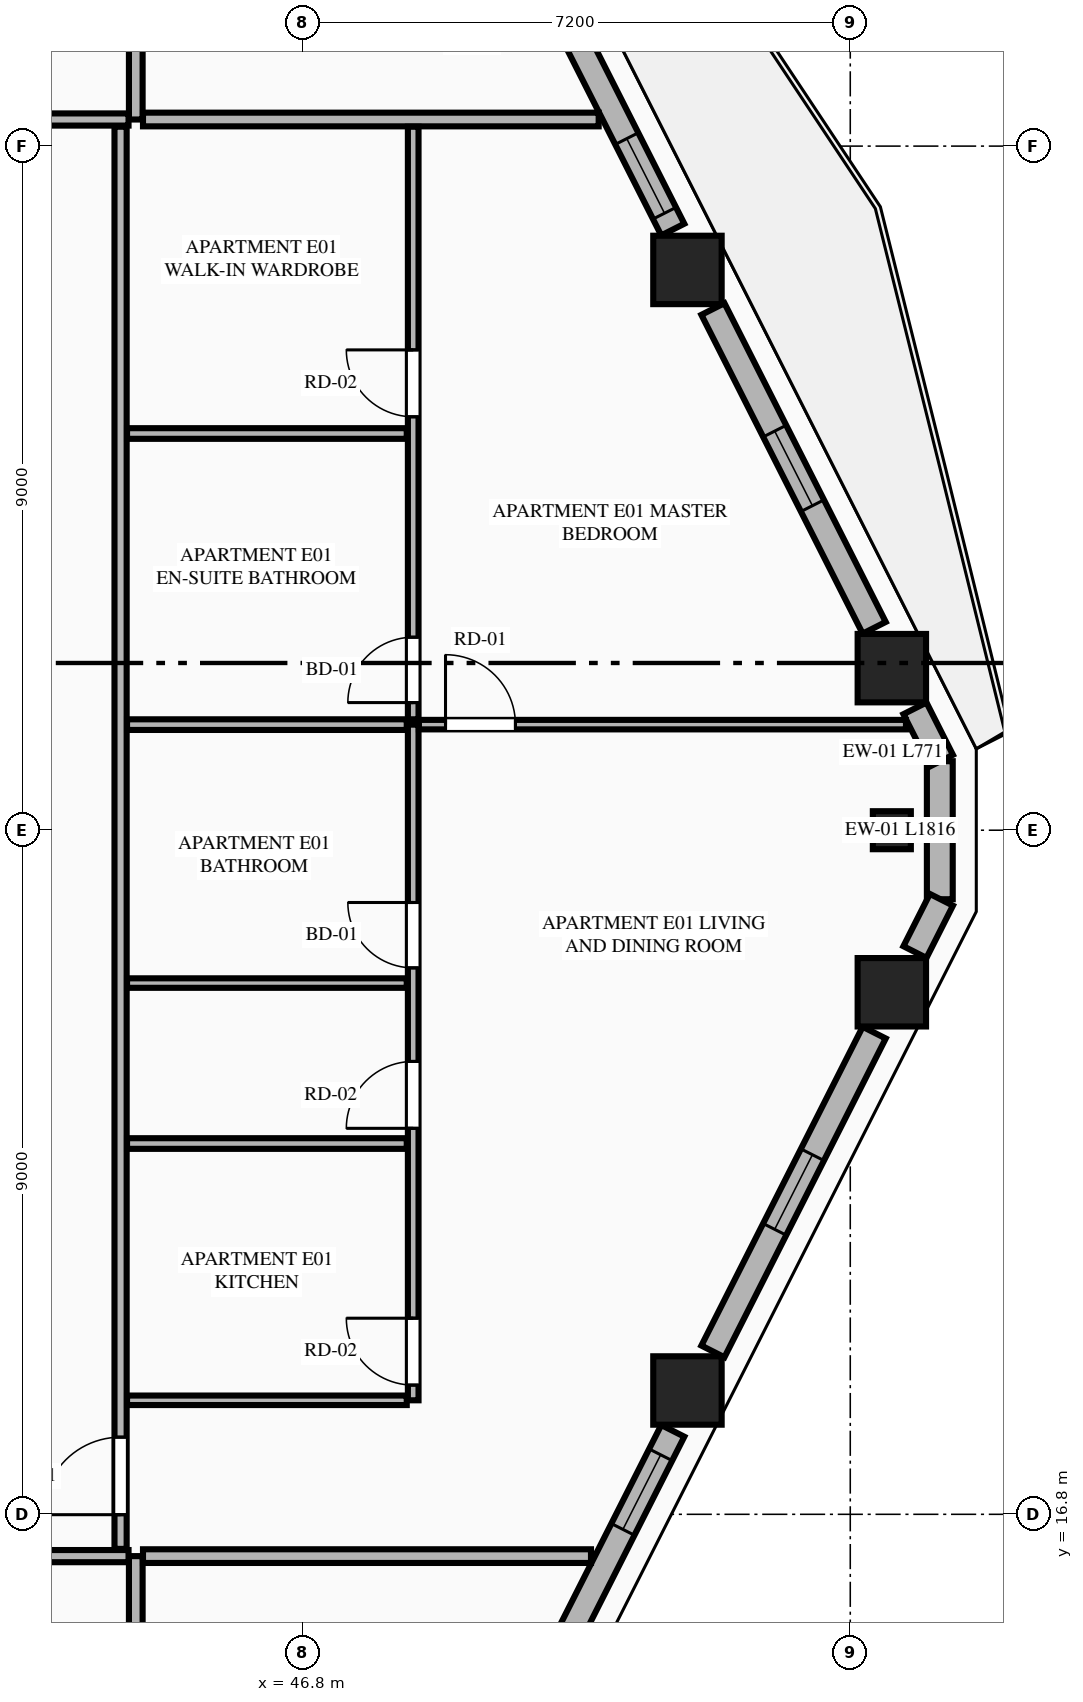
"""IFC4 building model, lengths in metres.
Left out: names, types, materials, properties, quantities, classifications, styles, units other than length and angle.
Written with IfcOpenShell. Run it as: python <this file> out.ifc"""

import sys

from ifc_helpers import new_model, si_unit, direction, frame, frame_2d, origin, origin_2d, place, context, subcontext, project, spatial, rectangle, extrude, element, fill, save


model = new_model("IFC4")
c1 = context("Model", 3, precision=1e-05, world=origin(), true_north=direction((0.0, 1.0)))
c2 = subcontext(c1, "Body", "Model", "MODEL_VIEW")
j1 = project(units=[si_unit("LENGTHUNIT", "METRE"), si_unit("PLANEANGLEUNIT", "RADIAN")], contexts=[c1])
p1 = place(None, origin())
s1 = spatial("IfcSite", under=j1, at=p1, CompositionType="ELEMENT")
p2 = place(p1, origin())
s2 = spatial("IfcBuilding", under=s1, at=p2, CompositionType="ELEMENT")
p3 = place(p2, frame((0.0, 0.0, 179.0)))
s3 = spatial("IfcBuildingStorey", under=s2, at=p3, CompositionType="ELEMENT", Elevation=179.0)
for number, where, z_axis, x_axis in (
    (1, (51.858, 18.429, 0.0), (0.0, 0.0, 1.0), (1.0, 0.0, 0.0)),
    (2, (54.547, 23.668, 0.0), (0.0, 0.0, 1.0), (1.0, 0.0, 0.0)),
    (3, (54.547, 27.932, 0.0), (0.0, 0.0, 1.0), (1.0, 0.0, 0.0)),
    (4, (51.858, 33.171, 0.0), (0.0, 0.0, 1.0), (1.0, 0.0, 0.0)),
):
    element("IfcColumn", number, at=place(p3, frame(where, z_axis=z_axis, x_axis=x_axis)), inside=s3, PredefinedType="COLUMN", context=c2, shape_type="SweptSolid", body=[
        extrude(rectangle(XDim=0.9, YDim=0.9, at=origin_2d()), origin(), (0.0, 0.0, 1.0), 3.55),
    ])
p4 = place(p3, frame((54.547, 25.8, 0.0), z_axis=(0.0, 0.0, 1.0), x_axis=(0.0, 1.0, 0.0)))
e5 = element("IfcColumn", 5, at=p4, inside=s3, PredefinedType="PILASTER", context=c2, shape_type="SweptSolid", body=[
    extrude(rectangle(XDim=0.5, YDim=0.35, at=origin_2d()), origin(), (0.0, 0.0, 1.0), 3.55),
])
p5 = place(p3, frame((55.178, 24.892, 0.0), z_axis=(0.0, 0.0, 1.0), x_axis=(0.0, 1.0, 0.0)))
e6 = element("IfcWall", 6, at=p5, inside=s3, PredefinedType="STANDARD", context=c2, shape_type="SweptSolid", body=[
    extrude(rectangle(XDim=1.816, YDim=0.34, at=frame_2d((0.908, 0.0))), origin(), (0.0, 0.0, 1.0), 3.35),
])
p6 = place(p3, frame((49.448, 13.517, 0.0), z_axis=(0.0, 0.0, 1.0), x_axis=(0.451544279509, 0.892248711763, 0.0)))
e7 = element("IfcWall", 7, at=p6, inside=s3, PredefinedType="STANDARD", context=c2, shape_type="SweptSolid", body=[
    extrude(rectangle(XDim=4.91, YDim=0.34, at=frame_2d((2.455, 0.0))), origin(), (0.0, 0.0, 1.0), 2.883),
])
p7 = place(p6, frame((0.851, 0.0, 0.75)))
e8 = element("IfcOpeningElement", 8, at=p7, cuts=e7, PredefinedType="OPENING", context=c2, shape_type="SweptSolid", body=[
    extrude(rectangle(XDim=1.1, YDim=1.983, at=frame_2d((0.55, 0.991))), frame((0.0, 0.18, 0.0), z_axis=(0.0, -1.0, 0.0), x_axis=(1.0, 0.0, 0.0)), (0.0, 0.0, 1.0), 0.36),
])
p8 = place(p6, frame((3.457, 0.0, 0.75)))
e9 = element("IfcOpeningElement", 9, at=p8, cuts=e7, PredefinedType="OPENING", context=c2, shape_type="SweptSolid", body=[
    extrude(rectangle(XDim=1.1, YDim=1.983, at=frame_2d((0.55, 0.991))), frame((0.0, 0.18, 0.0), z_axis=(0.0, -1.0, 0.0), x_axis=(1.0, 0.0, 0.0)), (0.0, 0.0, 1.0), 0.36),
])
p9 = place(p3, frame((52.193, 18.943, 0.0), z_axis=(0.0, 0.0, 1.0), x_axis=(0.451447222193, 0.892297823361, 0.0)))
e10 = element("IfcWall", 10, at=p9, inside=s3, PredefinedType="STANDARD", context=c2, shape_type="SweptSolid", body=[
    extrude(rectangle(XDim=4.7, YDim=0.34, at=frame_2d((2.35, 0.0))), origin(), (0.0, 0.0, 1.0), 2.883),
])
p10 = place(p9, frame((1.8, 0.0, 0.75)))
e11 = element("IfcOpeningElement", 11, at=p10, cuts=e10, PredefinedType="OPENING", context=c2, shape_type="SweptSolid", body=[
    extrude(rectangle(XDim=1.1, YDim=1.983, at=frame_2d((0.55, 0.991))), frame((0.0, 0.18, 0.0), z_axis=(0.0, -1.0, 0.0), x_axis=(1.0, 0.0, 0.0)), (0.0, 0.0, 1.0), 0.36),
])
for number, where, z_axis, x_axis in (
    (12, (54.851, 24.197, 0.0), (0.0, 0.0, 1.0), (0.451, 0.892, 0.0)),
    (13, (55.199, 26.715, 0.0), (0.0, 0.0, 1.0), (-0.451, 0.892, 0.0)),
):
    element("IfcWall", number, at=place(p3, frame(where, z_axis=z_axis, x_axis=x_axis)), inside=s3, PredefinedType="STANDARD", context=c2, shape_type="SweptSolid", body=[
        extrude(rectangle(XDim=0.771, YDim=0.34, at=frame_2d((0.385, 0.0))), origin(), (0.0, 0.0, 1.0), 3.35),
    ])
p11 = place(p3, frame((54.315, 28.463, 0.0), z_axis=(0.0, 0.0, 1.0), x_axis=(-0.451426298588, 0.892308409096, 0.0)))
e14 = element("IfcWall", 14, at=p11, inside=s3, PredefinedType="STANDARD", context=c2, shape_type="SweptSolid", body=[
    extrude(rectangle(XDim=4.7, YDim=0.34, at=frame_2d((2.35, 0.0))), origin(), (0.0, 0.0, 1.0), 2.883),
])
p12 = place(p11, frame((1.8, 0.0, 0.75)))
e15 = element("IfcOpeningElement", 15, at=p12, cuts=e14, PredefinedType="OPENING", context=c2, shape_type="SweptSolid", body=[
    extrude(rectangle(XDim=1.1, YDim=1.983, at=frame_2d((0.55, 0.991))), frame((0.0, 0.18, 0.0), z_axis=(0.0, -1.0, 0.0), x_axis=(1.0, 0.0, 0.0)), (0.0, 0.0, 1.0), 0.36),
])
p13 = place(p3, frame((51.665, 33.702, 0.0), z_axis=(0.0, 0.0, 1.0), x_axis=(-0.451524246964, 0.89225884944, 0.0)))
e16 = element("IfcWall", 16, at=p13, inside=s3, PredefinedType="STANDARD", context=c2, shape_type="SweptSolid", body=[
    extrude(rectangle(XDim=4.91, YDim=0.34, at=frame_2d((2.455, 0.0))), origin(), (0.0, 0.0, 1.0), 2.883),
])
p14 = place(p13, frame((2.842, 0.0, 0.0)))
e17 = element("IfcOpeningElement", 17, at=p14, cuts=e16, PredefinedType="OPENING", context=c2, shape_type="SweptSolid", body=[
    extrude(rectangle(XDim=1.1, YDim=2.25, at=frame_2d((0.55, 1.125))), frame((0.0, 0.18, 0.0), z_axis=(0.0, -1.0, 0.0), x_axis=(1.0, 0.0, 0.0)), (0.0, 0.0, 1.0), 0.36),
])
p15 = place(p13, frame((0.241, 0.0, 0.75)))
e18 = element("IfcOpeningElement", 18, at=p15, cuts=e16, PredefinedType="OPENING", context=c2, shape_type="SweptSolid", body=[
    extrude(rectangle(XDim=1.1, YDim=1.983, at=frame_2d((0.55, 0.991))), frame((0.0, 0.18, 0.0), z_axis=(0.0, -1.0, 0.0), x_axis=(1.0, 0.0, 0.0)), (0.0, 0.0, 1.0), 0.36),
])
p16 = place(p3, frame((44.6, 5.968, 0.0), z_axis=(0.0, 0.0, 1.0), x_axis=(0.0, 1.0, 0.0)))
e19 = element("IfcWall", 19, at=p16, inside=s3, PredefinedType="PARTITIONING", context=c2, shape_type="SweptSolid", body=[
    extrude(rectangle(XDim=10.282, YDim=0.18, at=frame_2d((5.141, 0.0))), origin(), (0.0, 0.0, 1.0), 3.35),
])
p17 = place(p3, frame((28.952, 16.25, 0.0), z_axis=(0.0, 0.0, 1.0), x_axis=(1.0, 0.0, 0.0)))
e20 = element("IfcWall", 20, at=p17, inside=s3, PredefinedType="PARTITIONING", context=c2, shape_type="SweptSolid", body=[
    extrude(rectangle(XDim=15.553, YDim=0.16, at=frame_2d((7.776, 0.0))), origin(), (0.0, 0.0, 1.0), 3.35),
])
p18 = place(p17, frame((0.355, 0.0, 0.0)))
e21 = element("IfcOpeningElement", 21, at=p18, cuts=e20, PredefinedType="OPENING", context=c2, shape_type="SweptSolid", body=[
    extrude(rectangle(XDim=1.02, YDim=2.25, at=frame_2d((0.51, 1.125))), frame((0.0, 0.09, 0.0), z_axis=(0.0, -1.0, 0.0), x_axis=(1.0, 0.0, 0.0)), (0.0, 0.0, 1.0), 0.18),
])
p19 = place(p3, frame((44.6, 35.15, 0.0), z_axis=(0.0, 0.0, 1.0), x_axis=(0.0, 1.0, 0.0)))
e22 = element("IfcWall", 22, at=p19, inside=s3, PredefinedType="PARTITIONING", context=c2, shape_type="SweptSolid", body=[
    extrude(rectangle(XDim=10.482, YDim=0.18, at=frame_2d((5.241, 0.0))), origin(), (0.0, 0.0, 1.0), 3.35),
])
p20 = place(p3, frame((36.038, 35.15, 0.0), z_axis=(0.0, 0.0, 1.0), x_axis=(1.0, 0.0, 0.0)))
e23 = element("IfcWall", 23, at=p20, inside=s3, PredefinedType="PARTITIONING", context=c2, shape_type="SweptSolid", body=[
    extrude(rectangle(XDim=8.467, YDim=0.16, at=frame_2d((4.233, 0.0))), origin(), (0.0, 0.0, 1.0), 3.35),
])
p21 = place(p20, frame((6.212, 0.0, 0.0)))
e24 = element("IfcOpeningElement", 24, at=p21, cuts=e23, PredefinedType="OPENING", context=c2, shape_type="SweptSolid", body=[
    extrude(rectangle(XDim=1.02, YDim=2.25, at=frame_2d((0.51, 1.125))), frame((0.0, 0.09, 0.0), z_axis=(0.0, -1.0, 0.0), x_axis=(1.0, 0.0, 0.0)), (0.0, 0.0, 1.0), 0.18),
])
p22 = place(p3, frame((44.695, 16.25, 0.0), z_axis=(0.0, 0.0, 1.0), x_axis=(1.0, 0.0, 0.0)))
e25 = element("IfcWall", 25, at=p22, inside=s3, PredefinedType="PARTITIONING", context=c2, shape_type="SweptSolid", body=[
    extrude(rectangle(XDim=5.894, YDim=0.18, at=frame_2d((2.947, 0.0))), origin(), (0.0, 0.0, 1.0), 3.35),
])
p23 = place(p3, frame((44.695, 35.15, 0.0), z_axis=(0.0, 0.0, 1.0), x_axis=(1.0, 0.0, 0.0)))
e26 = element("IfcWall", 26, at=p23, inside=s3, PredefinedType="PARTITIONING", context=c2, shape_type="SweptSolid", body=[
    extrude(rectangle(XDim=5.995, YDim=0.18, at=frame_2d((2.998, 0.0))), origin(), (0.0, 0.0, 1.0), 3.35),
])
p24 = place(p3, frame((44.4, 16.345, 0.0), z_axis=(0.0, 0.0, 1.0), x_axis=(0.0, 1.0, 0.0)))
e27 = element("IfcWall", 27, at=p24, inside=s3, PredefinedType="PARTITIONING", context=c2, shape_type="SweptSolid", body=[
    extrude(rectangle(XDim=18.71, YDim=0.16, at=frame_2d((9.355, 0.0))), origin(), (0.0, 0.0, 1.0), 3.35),
])
p25 = place(p24, frame((0.45, 0.0, 0.0)))
e28 = element("IfcOpeningElement", 28, at=p25, cuts=e27, PredefinedType="OPENING", context=c2, shape_type="SweptSolid", body=[
    extrude(rectangle(XDim=1.02, YDim=2.25, at=frame_2d((0.51, 1.125))), frame((0.0, 0.09, 0.0), z_axis=(0.0, -1.0, 0.0), x_axis=(1.0, 0.0, 0.0)), (0.0, 0.0, 1.0), 0.18),
])
p26 = place(p3, frame((44.485, 18.3, 0.0), z_axis=(0.0, 0.0, 1.0), x_axis=(1.0, 0.0, 0.0)))
e29 = element("IfcWall", 29, at=p26, inside=s3, PredefinedType="PARTITIONING", context=c2, shape_type="SweptSolid", body=[
    extrude(rectangle(XDim=3.68, YDim=0.125, at=frame_2d((1.84, 0.0))), origin(), (0.0, 0.0, 1.0), 2.807),
])
p27 = place(p3, frame((48.25, 18.3, 0.0), z_axis=(0.0, 0.0, 1.0), x_axis=(0.0, 1.0, 0.0)))
e30 = element("IfcWall", 30, at=p27, inside=s3, PredefinedType="PLUMBINGWALL", context=c2, shape_type="SweptSolid", body=[
    extrude(rectangle(XDim=8.889, YDim=0.14, at=frame_2d((4.444, 0.0))), origin(), (0.0, 0.0, 1.0), 3.35),
])
p28 = place(p27, frame((0.2, 0.0, 0.0)))
e31 = element("IfcOpeningElement", 31, at=p28, cuts=e30, PredefinedType="OPENING", context=c2, shape_type="SweptSolid", body=[
    extrude(rectangle(XDim=0.88, YDim=2.15, at=frame_2d((0.44, 1.075))), frame((0.0, 0.08, 0.0), z_axis=(0.0, -1.0, 0.0), x_axis=(1.0, 0.0, 0.0)), (0.0, 0.0, 1.0), 0.16),
])
p29 = place(p27, frame((3.578, 0.0, 0.0)))
e32 = element("IfcOpeningElement", 32, at=p29, cuts=e30, PredefinedType="OPENING", context=c2, shape_type="SweptSolid", body=[
    extrude(rectangle(XDim=0.88, YDim=2.15, at=frame_2d((0.44, 1.075))), frame((0.0, 0.08, 0.0), z_axis=(0.0, -1.0, 0.0), x_axis=(1.0, 0.0, 0.0)), (0.0, 0.0, 1.0), 0.16),
])
p30 = place(p27, frame((5.689, 0.0, 0.0)))
e33 = element("IfcOpeningElement", 33, at=p30, cuts=e30, PredefinedType="OPENING", context=c2, shape_type="SweptSolid", body=[
    extrude(rectangle(XDim=0.86, YDim=2.1, at=frame_2d((0.43, 1.05))), frame((0.0, 0.08, 0.0), z_axis=(0.0, -1.0, 0.0), x_axis=(1.0, 0.0, 0.0)), (0.0, 0.0, 1.0), 0.16),
])
p31 = place(p3, frame((48.25, 27.259, 0.0), z_axis=(0.0, 0.0, 1.0), x_axis=(0.0, 1.0, 0.0)))
e34 = element("IfcWall", 34, at=p31, inside=s3, PredefinedType="PLUMBINGWALL", context=c2, shape_type="SweptSolid", body=[
    extrude(rectangle(XDim=7.796, YDim=0.14, at=frame_2d((3.898, 0.0))), origin(), (0.0, 0.0, 1.0), 3.35),
])
p32 = place(p31, frame((0.22, 0.0, 0.0)))
e35 = element("IfcOpeningElement", 35, at=p32, cuts=e34, PredefinedType="OPENING", context=c2, shape_type="SweptSolid", body=[
    extrude(rectangle(XDim=0.86, YDim=2.1, at=frame_2d((0.43, 1.05))), frame((0.0, 0.08, 0.0), z_axis=(0.0, -1.0, 0.0), x_axis=(1.0, 0.0, 0.0)), (0.0, 0.0, 1.0), 0.16),
])
p33 = place(p31, frame((3.98, 0.0, 0.0)))
e36 = element("IfcOpeningElement", 36, at=p33, cuts=e34, PredefinedType="OPENING", context=c2, shape_type="SweptSolid", body=[
    extrude(rectangle(XDim=0.88, YDim=2.15, at=frame_2d((0.44, 1.075))), frame((0.0, 0.08, 0.0), z_axis=(0.0, -1.0, 0.0), x_axis=(1.0, 0.0, 0.0)), (0.0, 0.0, 1.0), 0.16),
])
p34 = place(p3, frame((44.485, 27.189, 0.0), z_axis=(0.0, 0.0, 1.0), x_axis=(1.0, 0.0, 0.0)))
e37 = element("IfcWall", 37, at=p34, inside=s3, PredefinedType="PLUMBINGWALL", context=c2, shape_type="SweptSolid", body=[
    extrude(rectangle(XDim=3.68, YDim=0.14, at=frame_2d((1.84, 0.0))), origin(), (0.0, 0.0, 1.0), 3.35),
])
p35 = place(p3, frame((48.325, 27.189, 0.0), z_axis=(0.0, 0.0, 1.0), x_axis=(1.0, 0.0, 0.0)))
e38 = element("IfcWall", 38, at=p35, inside=s3, PredefinedType="PARTITIONING", context=c2, shape_type="SweptSolid", body=[
    extrude(rectangle(XDim=6.408, YDim=0.125, at=frame_2d((3.204, 0.0))), origin(), (0.0, 0.0, 1.0), 3.35),
])
p36 = place(p35, frame((0.35, 0.0, 0.0)))
e39 = element("IfcOpeningElement", 39, at=p36, cuts=e38, PredefinedType="OPENING", context=c2, shape_type="SweptSolid", body=[
    extrude(rectangle(XDim=0.92, YDim=2.15, at=frame_2d((0.46, 1.075))), frame((0.0, 0.073, 0.0), z_axis=(0.0, -1.0, 0.0), x_axis=(1.0, 0.0, 0.0)), (0.0, 0.0, 1.0), 0.145),
])
p37 = place(p3, frame((44.485, 21.678, 0.0), z_axis=(0.0, 0.0, 1.0), x_axis=(1.0, 0.0, 0.0)))
e40 = element("IfcWall", 40, at=p37, inside=s3, PredefinedType="PLUMBINGWALL", context=c2, shape_type="SweptSolid", body=[
    extrude(rectangle(XDim=3.68, YDim=0.14, at=frame_2d((1.84, 0.0))), origin(), (0.0, 0.0, 1.0), 3.35),
])
p38 = place(p3, frame((44.485, 23.789, 0.0), z_axis=(0.0, 0.0, 1.0), x_axis=(1.0, 0.0, 0.0)))
e41 = element("IfcWall", 41, at=p38, inside=s3, PredefinedType="PARTITIONING", context=c2, shape_type="SweptSolid", body=[
    extrude(rectangle(XDim=3.68, YDim=0.125, at=frame_2d((1.84, 0.0))), origin(), (0.0, 0.0, 1.0), 2.807),
])
p39 = place(p3, frame((44.485, 31.019, 0.0), z_axis=(0.0, 0.0, 1.0), x_axis=(1.0, 0.0, 0.0)))
e42 = element("IfcWall", 42, at=p39, inside=s3, PredefinedType="PLUMBINGWALL", context=c2, shape_type="SweptSolid", body=[
    extrude(rectangle(XDim=3.68, YDim=0.14, at=frame_2d((1.84, 0.0))), origin(), (0.0, 0.0, 1.0), 3.35),
])
p40 = place(p10, origin())
e43 = element("IfcWindow", 43, at=p40, inside=s3, PartitioningType="SINGLE_PANEL", PredefinedType="WINDOW", context=c2, shape_type="SweptSolid", body=[
    extrude(rectangle(XDim=1.1, YDim=1.983, at=frame_2d((0.55, 0.991))), frame((0.0, 0.03, 0.0), z_axis=(0.0, -1.0, 0.0), x_axis=(1.0, 0.0, 0.0)), (0.0, 0.0, 1.0), 0.06),
])
fill(e11, e43)
p41 = place(p12, origin())
e44 = element("IfcWindow", 44, at=p41, inside=s3, PartitioningType="SINGLE_PANEL", PredefinedType="WINDOW", context=c2, shape_type="SweptSolid", body=[
    extrude(rectangle(XDim=1.1, YDim=1.983, at=frame_2d((0.55, 0.991))), frame((0.0, 0.03, 0.0), z_axis=(0.0, -1.0, 0.0), x_axis=(1.0, 0.0, 0.0)), (0.0, 0.0, 1.0), 0.06),
])
fill(e15, e44)
p42 = place(p28, origin())
e45 = element("IfcDoor", 45, at=p42, inside=s3, OperationType="SINGLE_SWING_RIGHT", PredefinedType="DOOR", context=c2, shape_type="SweptSolid", body=[
    extrude(rectangle(XDim=0.88, YDim=2.15, at=frame_2d((0.44, 1.075))), frame((0.0, 0.025, 0.0), z_axis=(0.0, -1.0, 0.0), x_axis=(1.0, 0.0, 0.0)), (0.0, 0.0, 1.0), 0.05),
])
fill(e31, e45)
p43 = place(p29, origin())
e46 = element("IfcDoor", 46, at=p43, inside=s3, OperationType="SINGLE_SWING_LEFT", PredefinedType="DOOR", context=c2, shape_type="SweptSolid", body=[
    extrude(rectangle(XDim=0.88, YDim=2.15, at=frame_2d((0.44, 1.075))), frame((0.0, 0.025, 0.0), z_axis=(0.0, -1.0, 0.0), x_axis=(1.0, 0.0, 0.0)), (0.0, 0.0, 1.0), 0.05),
])
fill(e32, e46)
p44 = place(p30, origin())
e47 = element("IfcDoor", 47, at=p44, inside=s3, OperationType="SINGLE_SWING_RIGHT", PredefinedType="DOOR", context=c2, shape_type="SweptSolid", body=[
    extrude(rectangle(XDim=0.86, YDim=2.1, at=frame_2d((0.43, 1.05))), frame((0.0, 0.025, 0.0), z_axis=(0.0, -1.0, 0.0), x_axis=(1.0, 0.0, 0.0)), (0.0, 0.0, 1.0), 0.05),
])
fill(e33, e47)
p45 = place(p32, origin())
e48 = element("IfcDoor", 48, at=p45, inside=s3, OperationType="SINGLE_SWING_LEFT", PredefinedType="DOOR", context=c2, shape_type="SweptSolid", body=[
    extrude(rectangle(XDim=0.86, YDim=2.1, at=frame_2d((0.43, 1.05))), frame((0.0, 0.025, 0.0), z_axis=(0.0, -1.0, 0.0), x_axis=(1.0, 0.0, 0.0)), (0.0, 0.0, 1.0), 0.05),
])
fill(e35, e48)
p46 = place(p33, origin())
e49 = element("IfcDoor", 49, at=p46, inside=s3, OperationType="SINGLE_SWING_RIGHT", PredefinedType="DOOR", context=c2, shape_type="SweptSolid", body=[
    extrude(rectangle(XDim=0.88, YDim=2.15, at=frame_2d((0.44, 1.075))), frame((0.0, 0.025, 0.0), z_axis=(0.0, -1.0, 0.0), x_axis=(1.0, 0.0, 0.0)), (0.0, 0.0, 1.0), 0.05),
])
fill(e36, e49)
p47 = place(p25, origin())
e50 = element("IfcDoor", 50, at=p47, inside=s3, OperationType="SINGLE_SWING_LEFT", PredefinedType="DOOR", context=c2, shape_type="SweptSolid", body=[
    extrude(rectangle(XDim=1.02, YDim=2.25, at=frame_2d((0.51, 1.125))), frame((0.0, 0.025, 0.0), z_axis=(0.0, -1.0, 0.0), x_axis=(1.0, 0.0, 0.0)), (0.0, 0.0, 1.0), 0.05),
])
fill(e28, e50)
p48 = place(p36, origin())
e51 = element("IfcDoor", 51, at=p48, inside=s3, OperationType="SINGLE_SWING_LEFT", PredefinedType="DOOR", context=c2, shape_type="SweptSolid", body=[
    extrude(rectangle(XDim=0.92, YDim=2.15, at=frame_2d((0.46, 1.075))), frame((0.0, 0.025, 0.0), z_axis=(0.0, -1.0, 0.0), x_axis=(1.0, 0.0, 0.0)), (0.0, 0.0, 1.0), 0.05),
])
fill(e39, e51)
p49 = place(p8, origin())
e52 = element("IfcWindow", 52, at=p49, inside=s3, PartitioningType="SINGLE_PANEL", PredefinedType="WINDOW", context=c2, shape_type="SweptSolid", body=[
    extrude(rectangle(XDim=1.1, YDim=1.983, at=frame_2d((0.55, 0.991))), frame((0.0, 0.03, 0.0), z_axis=(0.0, -1.0, 0.0), x_axis=(1.0, 0.0, 0.0)), (0.0, 0.0, 1.0), 0.06),
])
fill(e9, e52)
p50 = place(p15, origin())
e53 = element("IfcWindow", 53, at=p50, inside=s3, PartitioningType="SINGLE_PANEL", PredefinedType="WINDOW", context=c2, shape_type="SweptSolid", body=[
    extrude(rectangle(XDim=1.1, YDim=1.983, at=frame_2d((0.55, 0.991))), frame((0.0, 0.03, 0.0), z_axis=(0.0, -1.0, 0.0), x_axis=(1.0, 0.0, 0.0)), (0.0, 0.0, 1.0), 0.06),
])
fill(e18, e53)
save(model, sys.argv[1])
